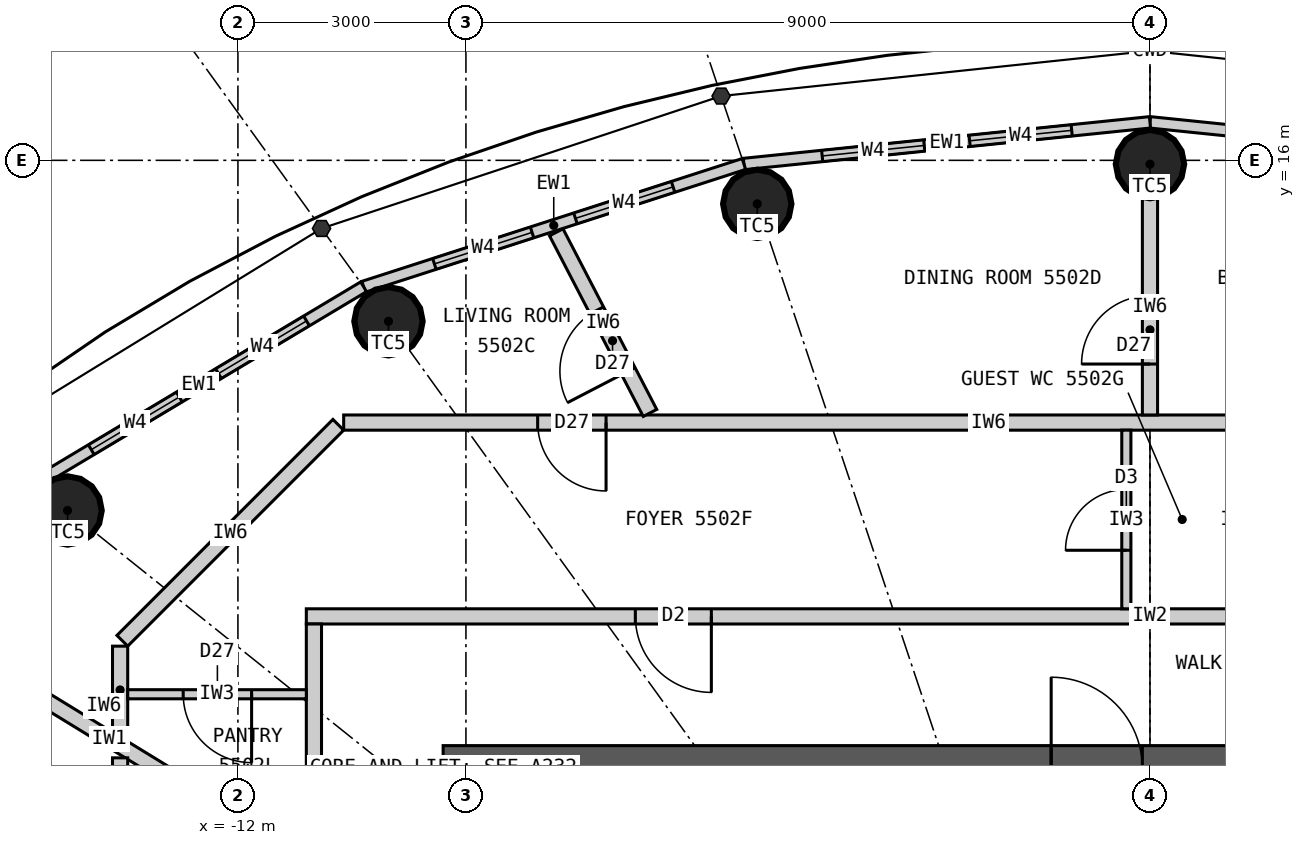
"""IFC4 building model, lengths in metres.
Left out: names, types, materials, properties, quantities, classifications, styles, units other than length and angle.
Written with IfcOpenShell. Run it as: python <this file> out.ifc"""

import sys

from ifc_helpers import new_model, si_unit, direction, frame, frame_2d, origin, origin_2d, place, context, subcontext, project, spatial, rectangle, circle, extrude, element, fill, save


model = new_model("IFC4")
c1 = context("Model", 3, precision=1e-05, world=origin(), true_north=direction((0.0, 1.0)))
c2 = subcontext(c1, "Body", "Model", "MODEL_VIEW")
j1 = project(units=[si_unit("LENGTHUNIT", "METRE"), si_unit("PLANEANGLEUNIT", "RADIAN")], contexts=[c1])
p1 = place(None, origin())
s1 = spatial("IfcSite", under=j1, at=p1, CompositionType="ELEMENT")
p2 = place(p1, origin())
s2 = spatial("IfcBuilding", under=s1, at=p2, CompositionType="ELEMENT")
p3 = place(p2, frame((0.0, 0.0, 206.1)))
s3 = spatial("IfcBuildingStorey", under=s2, at=p3, CompositionType="ELEMENT", Elevation=206.1)
for number, where, z_axis, x_axis in (
    (1, (0.0, 15.95, 0.0), (0.0, 0.0, 1.0), (1.0, 0.0, 0.0)),
    (2, (-5.167, 15.427, 0.0), (0.0, 0.0, 1.0), (1.0, 0.0, 0.0)),
    (3, (-10.019, 13.883, 0.0), (0.0, 0.0, 1.0), (1.0, 0.0, 0.0)),
    (4, (-14.241, 11.393, 0.0), (0.0, 0.0, 1.0), (1.0, 0.0, 0.0)),
):
    element("IfcColumn", number, at=place(p3, frame(where, z_axis=z_axis, x_axis=x_axis)), inside=s3, PredefinedType="COLUMN", context=c2, shape_type="SweptSolid", body=[
        extrude(circle(Radius=0.45, at=origin_2d()), origin(), (0.0, 0.0, 1.0), 3.3),
    ])
p4 = place(p3, frame((-9.3, 8.0, 0.0), z_axis=(0.0, 0.0, 1.0), x_axis=(1.0, 0.0, 0.0)))
e5 = element("IfcWall", 5, at=p4, inside=s3, PredefinedType="SHEAR", context=c2, shape_type="SweptSolid", body=[
    extrude(rectangle(XDim=18.6, YDim=0.6, at=frame_2d((9.3, 0.0))), origin(), (0.0, 0.0, 1.0), 3.3),
])
p5 = place(p4, frame((8.0, 0.0, 0.0)))
e6 = element("IfcOpeningElement", 6, at=p5, cuts=e5, PredefinedType="OPENING", context=c2, shape_type="SweptSolid", body=[
    extrude(rectangle(XDim=1.2, YDim=2.2, at=frame_2d((0.6, 1.1))), frame((0.0, 0.31, 0.0), z_axis=(0.0, -1.0, 0.0), x_axis=(1.0, 0.0, 0.0)), (0.0, 0.0, 1.0), 0.62),
])
p6 = place(p4, frame((15.6, 0.0, 0.0)))
e7 = element("IfcOpeningElement", 7, at=p6, cuts=e5, PredefinedType="OPENING", context=c2, shape_type="SweptSolid", body=[
    extrude(rectangle(XDim=0.9, YDim=2.2, at=frame_2d((0.45, 1.1))), frame((0.0, 0.31, 0.0), z_axis=(0.0, -1.0, 0.0), x_axis=(1.0, 0.0, 0.0)), (0.0, 0.0, 1.0), 0.62),
])
p7 = place(p3, frame((5.343, 15.952, 0.0), z_axis=(0.0, 0.0, 1.0), x_axis=(-0.994774574972, 0.102095763818, 0.0)))
e8 = element("IfcWall", 8, at=p7, inside=s3, PredefinedType="ELEMENTEDWALL", context=c2, shape_type="SweptSolid", body=[
    extrude(rectangle(XDim=5.371, YDim=0.15, at=frame_2d((2.686, 0.0))), origin(), (0.0, 0.0, 1.0), 3.12),
])
p8 = place(p7, frame((1.035, 0.0, 0.9)))
e9 = element("IfcOpeningElement", 9, at=p8, cuts=e8, PredefinedType="OPENING", context=c2, shape_type="SweptSolid", body=[
    extrude(rectangle(XDim=1.35, YDim=1.9, at=frame_2d((0.675, 0.95))), frame((0.0, 0.085, 0.0), z_axis=(0.0, -1.0, 0.0), x_axis=(1.0, 0.0, 0.0)), (0.0, 0.0, 1.0), 0.17),
])
p9 = place(p7, frame((2.985, 0.0, 0.9)))
e10 = element("IfcOpeningElement", 10, at=p9, cuts=e8, PredefinedType="OPENING", context=c2, shape_type="SweptSolid", body=[
    extrude(rectangle(XDim=1.35, YDim=1.9, at=frame_2d((0.675, 0.95))), frame((0.0, 0.085, 0.0), z_axis=(0.0, -1.0, 0.0), x_axis=(1.0, 0.0, 0.0)), (0.0, 0.0, 1.0), 0.17),
])
p10 = place(p3, frame((0.0, 16.5, 0.0), z_axis=(0.0, 0.0, 1.0), x_axis=(-0.994774574972, -0.102095763818, 0.0)))
e11 = element("IfcWall", 11, at=p10, inside=s3, PredefinedType="ELEMENTEDWALL", context=c2, shape_type="SweptSolid", body=[
    extrude(rectangle(XDim=5.371, YDim=0.15, at=frame_2d((2.686, 0.0))), origin(), (0.0, 0.0, 1.0), 3.12),
])
p11 = place(p10, frame((1.035, 0.0, 0.9)))
e12 = element("IfcOpeningElement", 12, at=p11, cuts=e11, PredefinedType="OPENING", context=c2, shape_type="SweptSolid", body=[
    extrude(rectangle(XDim=1.35, YDim=1.9, at=frame_2d((0.675, 0.95))), frame((0.0, 0.085, 0.0), z_axis=(0.0, -1.0, 0.0), x_axis=(1.0, 0.0, 0.0)), (0.0, 0.0, 1.0), 0.17),
])
p12 = place(p10, frame((2.985, 0.0, 0.9)))
e13 = element("IfcOpeningElement", 13, at=p12, cuts=e11, PredefinedType="OPENING", context=c2, shape_type="SweptSolid", body=[
    extrude(rectangle(XDim=1.35, YDim=1.9, at=frame_2d((0.675, 0.95))), frame((0.0, 0.085, 0.0), z_axis=(0.0, -1.0, 0.0), x_axis=(1.0, 0.0, 0.0)), (0.0, 0.0, 1.0), 0.17),
])
p13 = place(p3, frame((-5.343, 15.952, 0.0), z_axis=(0.0, 0.0, 1.0), x_axis=(-0.951644702515, -0.307200846638, 0.0)))
e14 = element("IfcWall", 14, at=p13, inside=s3, PredefinedType="ELEMENTEDWALL", context=c2, shape_type="SweptSolid", body=[
    extrude(rectangle(XDim=5.258, YDim=0.15, at=frame_2d((2.629, 0.0))), origin(), (0.0, 0.0, 1.0), 3.12),
])
p14 = place(p13, frame((0.979, 0.0, 0.9)))
e15 = element("IfcOpeningElement", 15, at=p14, cuts=e14, PredefinedType="OPENING", context=c2, shape_type="SweptSolid", body=[
    extrude(rectangle(XDim=1.35, YDim=1.9, at=frame_2d((0.675, 0.95))), frame((0.0, 0.085, 0.0), z_axis=(0.0, -1.0, 0.0), x_axis=(1.0, 0.0, 0.0)), (0.0, 0.0, 1.0), 0.17),
])
p15 = place(p13, frame((2.929, 0.0, 0.9)))
e16 = element("IfcOpeningElement", 16, at=p15, cuts=e14, PredefinedType="OPENING", context=c2, shape_type="SweptSolid", body=[
    extrude(rectangle(XDim=1.35, YDim=1.9, at=frame_2d((0.675, 0.95))), frame((0.0, 0.085, 0.0), z_axis=(0.0, -1.0, 0.0), x_axis=(1.0, 0.0, 0.0)), (0.0, 0.0, 1.0), 0.17),
])
p16 = place(p3, frame((-10.346, 14.336, 0.0), z_axis=(0.0, 0.0, 1.0), x_axis=(-0.85822150553, -0.513279502265, 0.0)))
e17 = element("IfcWall", 17, at=p16, inside=s3, PredefinedType="ELEMENTEDWALL", context=c2, shape_type="SweptSolid", body=[
    extrude(rectangle(XDim=5.05, YDim=0.15, at=frame_2d((2.525, 0.0))), origin(), (0.0, 0.0, 1.0), 3.12),
])
p17 = place(p16, frame((0.875, 0.0, 0.9)))
e18 = element("IfcOpeningElement", 18, at=p17, cuts=e17, PredefinedType="OPENING", context=c2, shape_type="SweptSolid", body=[
    extrude(rectangle(XDim=1.35, YDim=1.9, at=frame_2d((0.675, 0.95))), frame((0.0, 0.085, 0.0), z_axis=(0.0, -1.0, 0.0), x_axis=(1.0, 0.0, 0.0)), (0.0, 0.0, 1.0), 0.17),
])
p18 = place(p16, frame((2.825, 0.0, 0.9)))
e19 = element("IfcOpeningElement", 19, at=p18, cuts=e17, PredefinedType="OPENING", context=c2, shape_type="SweptSolid", body=[
    extrude(rectangle(XDim=1.35, YDim=1.9, at=frame_2d((0.675, 0.95))), frame((0.0, 0.085, 0.0), z_axis=(0.0, -1.0, 0.0), x_axis=(1.0, 0.0, 0.0)), (0.0, 0.0, 1.0), 0.17),
])
p19 = place(p3, frame((-11.1, 10.0, 0.0), z_axis=(0.0, 0.0, 1.0), x_axis=(1.0, 0.0, 0.0)))
e20 = element("IfcWall", 20, at=p19, inside=s3, PredefinedType="PARTITIONING", context=c2, shape_type="SweptSolid", body=[
    extrude(rectangle(XDim=22.2, YDim=0.2, at=frame_2d((11.1, 0.0))), origin(), (0.0, 0.0, 1.0), 3.12),
])
p20 = place(p19, frame((20.9, 0.0, 0.0)))
e21 = element("IfcOpeningElement", 21, at=p20, cuts=e20, PredefinedType="OPENING", context=c2, shape_type="SweptSolid", body=[
    extrude(rectangle(XDim=1.0, YDim=2.2, at=frame_2d((0.5, 1.1))), frame((0.0, 0.11, 0.0), z_axis=(0.0, -1.0, 0.0), x_axis=(1.0, 0.0, 0.0)), (0.0, 0.0, 1.0), 0.22),
])
p21 = place(p19, frame((4.329, 0.0, 0.0)))
e22 = element("IfcOpeningElement", 22, at=p21, cuts=e20, PredefinedType="OPENING", context=c2, shape_type="SweptSolid", body=[
    extrude(rectangle(XDim=1.0, YDim=2.2, at=frame_2d((0.5, 1.1))), frame((0.0, 0.11, 0.0), z_axis=(0.0, -1.0, 0.0), x_axis=(1.0, 0.0, 0.0)), (0.0, 0.0, 1.0), 0.22),
])
p22 = place(p3, frame((-11.0, 9.9, 0.0), z_axis=(0.0, 0.0, 1.0), x_axis=(0.0, -1.0, 0.0)))
e23 = element("IfcWall", 23, at=p22, inside=s3, PredefinedType="PARTITIONING", context=c2, shape_type="SweptSolid", body=[
    extrude(rectangle(XDim=19.8, YDim=0.2, at=frame_2d((9.9, 0.0))), origin(), (0.0, 0.0, 1.0), 3.12),
])
p23 = place(p22, frame((5.075, 0.0, 0.0)))
e24 = element("IfcOpeningElement", 24, at=p23, cuts=e23, PredefinedType="OPENING", context=c2, shape_type="SweptSolid", body=[
    extrude(rectangle(XDim=1.0, YDim=2.2, at=frame_2d((0.5, 1.1))), frame((0.0, 0.11, 0.0), z_axis=(0.0, -1.0, 0.0), x_axis=(1.0, 0.0, 0.0)), (0.0, 0.0, 1.0), 0.22),
])
p24 = place(p22, frame((18.645, 0.0, 0.0)))
e25 = element("IfcOpeningElement", 25, at=p24, cuts=e23, PredefinedType="OPENING", context=c2, shape_type="SweptSolid", body=[
    extrude(rectangle(XDim=1.0, YDim=2.2, at=frame_2d((0.5, 1.1))), frame((0.0, 0.11, 0.0), z_axis=(0.0, -1.0, 0.0), x_axis=(1.0, 0.0, 0.0)), (0.0, 0.0, 1.0), 0.22),
])
p25 = place(p3, frame((-11.1, 6.797, 0.0), z_axis=(0.0, 0.0, 1.0), x_axis=(-0.852799818179, 0.522237943963, 0.0)))
e26 = element("IfcWall", 26, at=p25, inside=s3, PredefinedType="PARTITIONING", context=c2, shape_type="SweptSolid", body=[
    extrude(rectangle(XDim=6.077, YDim=0.2, at=frame_2d((3.039, 0.0))), origin(), (0.0, 0.0, 1.0), 3.12),
])
p26 = place(p3, frame((6.364, 12.55, 0.0), z_axis=(0.0, 0.0, 1.0), x_axis=(-1.0, 0.0, 0.0)))
e27 = element("IfcWall", 27, at=p26, inside=s3, PredefinedType="PARTITIONING", context=c2, shape_type="SweptSolid", body=[
    extrude(rectangle(XDim=16.972, YDim=0.2, at=frame_2d((8.486, 0.0))), origin(), (0.0, 0.0, 1.0), 3.12),
])
p27 = place(p26, frame((2.525, 0.0, 0.0)))
e28 = element("IfcOpeningElement", 28, at=p27, cuts=e27, PredefinedType="OPENING", context=c2, shape_type="SweptSolid", body=[
    extrude(rectangle(XDim=0.8, YDim=2.1, at=frame_2d((0.4, 1.05))), frame((0.0, 0.11, 0.0), z_axis=(0.0, -1.0, 0.0), x_axis=(1.0, 0.0, 0.0)), (0.0, 0.0, 1.0), 0.22),
])
p28 = place(p26, frame((4.145, 0.0, 0.0)))
e29 = element("IfcOpeningElement", 29, at=p28, cuts=e27, PredefinedType="OPENING", context=c2, shape_type="SweptSolid", body=[
    extrude(rectangle(XDim=0.9, YDim=2.1, at=frame_2d((0.45, 1.05))), frame((0.0, 0.11, 0.0), z_axis=(0.0, -1.0, 0.0), x_axis=(1.0, 0.0, 0.0)), (0.0, 0.0, 1.0), 0.22),
])
p29 = place(p26, frame((13.52, 0.0, 0.0)))
e30 = element("IfcOpeningElement", 30, at=p29, cuts=e27, PredefinedType="OPENING", context=c2, shape_type="SweptSolid", body=[
    extrude(rectangle(XDim=0.9, YDim=2.1, at=frame_2d((0.45, 1.05))), frame((0.0, 0.11, 0.0), z_axis=(0.0, -1.0, 0.0), x_axis=(1.0, 0.0, 0.0)), (0.0, 0.0, 1.0), 0.22),
])
p30 = place(p3, frame((-10.679, 12.521, 0.0), z_axis=(0.0, 0.0, 1.0), x_axis=(-0.707106781187, -0.707106781187, 0.0)))
e31 = element("IfcWall", 31, at=p30, inside=s3, PredefinedType="PARTITIONING", context=c2, shape_type="SweptSolid", body=[
    extrude(rectangle(XDim=4.019, YDim=0.2, at=frame_2d((2.009, 0.0))), origin(), (0.0, 0.0, 1.0), 3.12),
])
p31 = place(p3, frame((-13.55, 9.609, 0.0), z_axis=(0.0, 0.0, 1.0), x_axis=(0.0, -1.0, 0.0)))
e32 = element("IfcWall", 32, at=p31, inside=s3, PredefinedType="PARTITIONING", context=c2, shape_type="SweptSolid", body=[
    extrude(rectangle(XDim=1.153, YDim=0.2, at=frame_2d((0.576, 0.0))), origin(), (0.0, 0.0, 1.0), 3.12),
])
p32 = place(p3, frame((0.0, 12.65, 0.0), z_axis=(0.0, 0.0, 1.0), x_axis=(0.0, 1.0, 0.0)))
e33 = element("IfcWall", 33, at=p32, inside=s3, PredefinedType="PARTITIONING", context=c2, shape_type="SweptSolid", body=[
    extrude(rectangle(XDim=2.85, YDim=0.2, at=frame_2d((1.425, 0.0))), origin(), (0.0, 0.0, 1.0), 2.42),
])
p33 = place(p32, frame((0.67, 0.0, 0.0)))
e34 = element("IfcOpeningElement", 34, at=p33, cuts=e33, PredefinedType="OPENING", context=c2, shape_type="SweptSolid", body=[
    extrude(rectangle(XDim=0.9, YDim=2.1, at=frame_2d((0.45, 1.05))), frame((0.0, 0.11, 0.0), z_axis=(0.0, -1.0, 0.0), x_axis=(1.0, 0.0, 0.0)), (0.0, 0.0, 1.0), 0.22),
])
p34 = place(p3, frame((-6.578, 12.677, 0.0), z_axis=(0.0, 0.0, 1.0), x_axis=(-0.460620531465, 0.887597164255, 0.0)))
e35 = element("IfcWall", 35, at=p34, inside=s3, PredefinedType="PARTITIONING", context=c2, shape_type="SweptSolid", body=[
    extrude(rectangle(XDim=2.678, YDim=0.2, at=frame_2d((1.339, 0.0))), origin(), (0.0, 0.0, 1.0), 3.12),
])
p35 = place(p34, frame((0.62, 0.0, 0.0)))
e36 = element("IfcOpeningElement", 36, at=p35, cuts=e35, PredefinedType="OPENING", context=c2, shape_type="SweptSolid", body=[
    extrude(rectangle(XDim=0.9, YDim=2.1, at=frame_2d((0.45, 1.05))), frame((0.0, 0.11, 0.0), z_axis=(0.0, -1.0, 0.0), x_axis=(1.0, 0.0, 0.0)), (0.0, 0.0, 1.0), 0.22),
])
p36 = place(p3, frame((-0.311, 10.1, 0.0), z_axis=(0.0, 0.0, 1.0), x_axis=(0.0, 1.0, 0.0)))
e37 = element("IfcWall", 37, at=p36, inside=s3, PredefinedType="PARTITIONING", context=c2, shape_type="SweptSolid", body=[
    extrude(rectangle(XDim=2.35, YDim=0.12, at=frame_2d((1.175, 0.0))), origin(), (0.0, 0.0, 1.0), 3.12),
])
p37 = place(p36, frame((0.77, 0.0, 0.0)))
e38 = element("IfcOpeningElement", 38, at=p37, cuts=e37, PredefinedType="OPENING", context=c2, shape_type="SweptSolid", body=[
    extrude(rectangle(XDim=0.8, YDim=2.1, at=frame_2d((0.4, 1.05))), frame((0.0, 0.07, 0.0), z_axis=(0.0, -1.0, 0.0), x_axis=(1.0, 0.0, 0.0)), (0.0, 0.0, 1.0), 0.14),
])
p38 = place(p3, frame((-11.1, 8.976, 0.0), z_axis=(0.0, 0.0, 1.0), x_axis=(-1.0, 0.0, 0.0)))
e39 = element("IfcWall", 39, at=p38, inside=s3, PredefinedType="PARTITIONING", context=c2, shape_type="SweptSolid", body=[
    extrude(rectangle(XDim=2.35, YDim=0.12, at=frame_2d((1.175, 0.0))), origin(), (0.0, 0.0, 1.0), 3.12),
])
p39 = place(p38, frame((0.72, 0.0, 0.0)))
e40 = element("IfcOpeningElement", 40, at=p39, cuts=e39, PredefinedType="OPENING", context=c2, shape_type="SweptSolid", body=[
    extrude(rectangle(XDim=0.9, YDim=2.1, at=frame_2d((0.45, 1.05))), frame((0.0, 0.07, 0.0), z_axis=(0.0, -1.0, 0.0), x_axis=(1.0, 0.0, 0.0)), (0.0, 0.0, 1.0), 0.14),
])
p40 = place(p3, frame((-13.55, 8.139, 0.0), z_axis=(0.0, 0.0, 1.0), x_axis=(0.0, -1.0, 0.0)))
e41 = element("IfcWall", 41, at=p40, inside=s3, PredefinedType="PARTITIONING", context=c2, shape_type="SweptSolid", body=[
    extrude(rectangle(XDim=12.496, YDim=0.2, at=frame_2d((6.248, 0.0))), origin(), (0.0, 0.0, 1.0), 3.12),
])
p41 = place(p40, frame((7.031, 0.0, 0.0)))
e42 = element("IfcOpeningElement", 42, at=p41, cuts=e41, PredefinedType="OPENING", context=c2, shape_type="SweptSolid", body=[
    extrude(rectangle(XDim=0.9, YDim=2.1, at=frame_2d((0.45, 1.05))), frame((0.0, 0.11, 0.0), z_axis=(0.0, -1.0, 0.0), x_axis=(1.0, 0.0, 0.0)), (0.0, 0.0, 1.0), 0.22),
])
p42 = place(p40, frame((9.373, 0.0, 0.0)))
e43 = element("IfcOpeningElement", 43, at=p42, cuts=e41, PredefinedType="OPENING", context=c2, shape_type="SweptSolid", body=[
    extrude(rectangle(XDim=0.8, YDim=2.1, at=frame_2d((0.4, 1.05))), frame((0.0, 0.11, 0.0), z_axis=(0.0, -1.0, 0.0), x_axis=(1.0, 0.0, 0.0)), (0.0, 0.0, 1.0), 0.22),
])
p43 = place(p40, frame((3.789, 0.0, 0.0)))
e44 = element("IfcOpeningElement", 44, at=p43, cuts=e41, PredefinedType="OPENING", context=c2, shape_type="SweptSolid", body=[
    extrude(rectangle(XDim=0.9, YDim=2.1, at=frame_2d((0.45, 1.05))), frame((0.0, 0.11, 0.0), z_axis=(0.0, -1.0, 0.0), x_axis=(1.0, 0.0, 0.0)), (0.0, 0.0, 1.0), 0.22),
])
p44 = place(p11, origin())
e45 = element("IfcWindow", 45, at=p44, inside=s3, PartitioningType="SINGLE_PANEL", PredefinedType="WINDOW", context=c2, shape_type="SweptSolid", body=[
    extrude(rectangle(XDim=1.35, YDim=1.9, at=frame_2d((0.675, 0.95))), frame((0.0, 0.03, 0.0), z_axis=(0.0, -1.0, 0.0), x_axis=(1.0, 0.0, 0.0)), (0.0, 0.0, 1.0), 0.06),
])
fill(e12, e45)
p45 = place(p12, origin())
e46 = element("IfcWindow", 46, at=p45, inside=s3, PartitioningType="SINGLE_PANEL", PredefinedType="WINDOW", context=c2, shape_type="SweptSolid", body=[
    extrude(rectangle(XDim=1.35, YDim=1.9, at=frame_2d((0.675, 0.95))), frame((0.0, 0.03, 0.0), z_axis=(0.0, -1.0, 0.0), x_axis=(1.0, 0.0, 0.0)), (0.0, 0.0, 1.0), 0.06),
])
fill(e13, e46)
p46 = place(p14, origin())
e47 = element("IfcWindow", 47, at=p46, inside=s3, PartitioningType="SINGLE_PANEL", PredefinedType="WINDOW", context=c2, shape_type="SweptSolid", body=[
    extrude(rectangle(XDim=1.35, YDim=1.9, at=frame_2d((0.675, 0.95))), frame((0.0, 0.03, 0.0), z_axis=(0.0, -1.0, 0.0), x_axis=(1.0, 0.0, 0.0)), (0.0, 0.0, 1.0), 0.06),
])
fill(e15, e47)
p47 = place(p15, origin())
e48 = element("IfcWindow", 48, at=p47, inside=s3, PartitioningType="SINGLE_PANEL", PredefinedType="WINDOW", context=c2, shape_type="SweptSolid", body=[
    extrude(rectangle(XDim=1.35, YDim=1.9, at=frame_2d((0.675, 0.95))), frame((0.0, 0.03, 0.0), z_axis=(0.0, -1.0, 0.0), x_axis=(1.0, 0.0, 0.0)), (0.0, 0.0, 1.0), 0.06),
])
fill(e16, e48)
p48 = place(p17, origin())
e49 = element("IfcWindow", 49, at=p48, inside=s3, PartitioningType="SINGLE_PANEL", PredefinedType="WINDOW", context=c2, shape_type="SweptSolid", body=[
    extrude(rectangle(XDim=1.35, YDim=1.9, at=frame_2d((0.675, 0.95))), frame((0.0, 0.03, 0.0), z_axis=(0.0, -1.0, 0.0), x_axis=(1.0, 0.0, 0.0)), (0.0, 0.0, 1.0), 0.06),
])
fill(e18, e49)
p49 = place(p18, origin())
e50 = element("IfcWindow", 50, at=p49, inside=s3, PartitioningType="SINGLE_PANEL", PredefinedType="WINDOW", context=c2, shape_type="SweptSolid", body=[
    extrude(rectangle(XDim=1.35, YDim=1.9, at=frame_2d((0.675, 0.95))), frame((0.0, 0.03, 0.0), z_axis=(0.0, -1.0, 0.0), x_axis=(1.0, 0.0, 0.0)), (0.0, 0.0, 1.0), 0.06),
])
fill(e19, e50)
p50 = place(p21, origin())
e51 = element("IfcDoor", 51, at=p50, inside=s3, OperationType="SINGLE_SWING_RIGHT", PredefinedType="DOOR", context=c2, shape_type="SweptSolid", body=[
    extrude(rectangle(XDim=1.0, YDim=2.2, at=frame_2d((0.5, 1.1))), frame((0.0, 0.025, 0.0), z_axis=(0.0, -1.0, 0.0), x_axis=(1.0, 0.0, 0.0)), (0.0, 0.0, 1.0), 0.05),
])
fill(e22, e51)
p51 = place(p37, origin())
e52 = element("IfcDoor", 52, at=p51, inside=s3, OperationType="SINGLE_SWING_LEFT", PredefinedType="DOOR", context=c2, shape_type="SweptSolid", body=[
    extrude(rectangle(XDim=0.8, YDim=2.1, at=frame_2d((0.4, 1.05))), frame((0.0, 0.025, 0.0), z_axis=(0.0, -1.0, 0.0), x_axis=(1.0, 0.0, 0.0)), (0.0, 0.0, 1.0), 0.05),
])
fill(e38, e52)
p52 = place(p39, origin())
e53 = element("IfcDoor", 53, at=p52, inside=s3, OperationType="SINGLE_SWING_LEFT", PredefinedType="DOOR", context=c2, shape_type="SweptSolid", body=[
    extrude(rectangle(XDim=0.9, YDim=2.1, at=frame_2d((0.45, 1.05))), frame((0.0, 0.025, 0.0), z_axis=(0.0, -1.0, 0.0), x_axis=(1.0, 0.0, 0.0)), (0.0, 0.0, 1.0), 0.05),
])
fill(e40, e53)
p53 = place(p29, origin())
e54 = element("IfcDoor", 54, at=p53, inside=s3, OperationType="SINGLE_SWING_LEFT", PredefinedType="DOOR", context=c2, shape_type="SweptSolid", body=[
    extrude(rectangle(XDim=0.9, YDim=2.1, at=frame_2d((0.45, 1.05))), frame((0.0, 0.025, 0.0), z_axis=(0.0, -1.0, 0.0), x_axis=(1.0, 0.0, 0.0)), (0.0, 0.0, 1.0), 0.05),
])
fill(e30, e54)
p54 = place(p33, origin())
e55 = element("IfcDoor", 55, at=p54, inside=s3, OperationType="SINGLE_SWING_LEFT", PredefinedType="DOOR", context=c2, shape_type="SweptSolid", body=[
    extrude(rectangle(XDim=0.9, YDim=2.1, at=frame_2d((0.45, 1.05))), frame((0.0, 0.025, 0.0), z_axis=(0.0, -1.0, 0.0), x_axis=(1.0, 0.0, 0.0)), (0.0, 0.0, 1.0), 0.05),
])
fill(e34, e55)
p55 = place(p35, origin())
e56 = element("IfcDoor", 56, at=p55, inside=s3, OperationType="SINGLE_SWING_LEFT", PredefinedType="DOOR", context=c2, shape_type="SweptSolid", body=[
    extrude(rectangle(XDim=0.9, YDim=2.1, at=frame_2d((0.45, 1.05))), frame((0.0, 0.025, 0.0), z_axis=(0.0, -1.0, 0.0), x_axis=(1.0, 0.0, 0.0)), (0.0, 0.0, 1.0), 0.05),
])
fill(e36, e56)
save(model, sys.argv[1])
